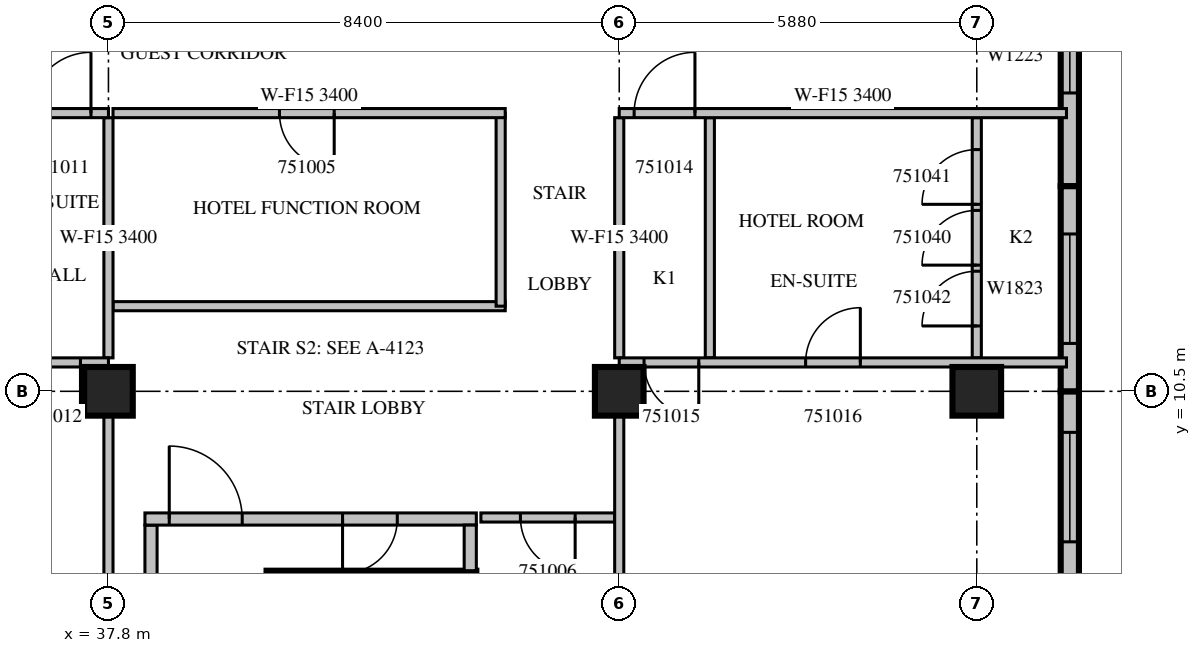
"""IFC4 building model, lengths in metres.
Left out: names, types, materials, properties, quantities, classifications, styles, units other than length and angle.
Written with IfcOpenShell. Run it as: python <this file> out.ifc"""

import sys

from ifc_helpers import new_model, si_unit, direction, frame, frame_2d, origin, origin_2d, place, context, subcontext, project, spatial, rectangle, extrude, source, transform, mapped, element, fill, save


model = new_model("IFC4")
c1 = context("Model", 3, precision=1e-05, world=origin(), true_north=direction((0.0, 1.0)))
c2 = subcontext(c1, "Body", "Model", "MODEL_VIEW")
j1 = project(units=[si_unit("LENGTHUNIT", "METRE"), si_unit("PLANEANGLEUNIT", "RADIAN")], contexts=[c1])
p1 = place(None, origin())
s1 = spatial("IfcSite", under=j1, at=p1, CompositionType="ELEMENT")
p2 = place(p1, origin())
s2 = spatial("IfcBuilding", under=s1, at=p2, CompositionType="ELEMENT")
p3 = place(p2, frame((0.0, 0.0, 227.2)))
s3 = spatial("IfcBuildingStorey", under=s2, at=p3, CompositionType="ELEMENT", Elevation=227.2)
m1 = source(origin(), c2, "Body", "SweptSolid", [
    extrude(rectangle(XDim=0.8, YDim=0.8, at=origin_2d()), origin(), (0.0, 0.0, 1.0), 3.8),
])
for number, where, z_axis, x_axis in (
    (1, (37.8, 10.5, 0.0), (0.0, 0.0, 1.0), (1.0, 0.0, 0.0)),
    (2, (46.2, 10.5, 0.0), (0.0, 0.0, 1.0), (1.0, 0.0, 0.0)),
    (3, (52.08, 10.5, 0.0), (0.0, 0.0, 1.0), (1.0, 0.0, 0.0)),
):
    element("IfcColumn", number, at=place(p3, frame(where, z_axis=z_axis, x_axis=x_axis)), inside=s3, PredefinedType="COLUMN", context=c2, shape_type="MappedRepresentation", body=[
        mapped(m1, transform((0.0, 0.0, 0.0), scale=1.0)),
    ])
m2 = source(origin(), c2, "Body", "SweptSolid", [
    extrude(rectangle(XDim=6.3, YDim=0.3, at=frame_2d((3.15, 0.0))), origin(), (0.0, 0.0, 1.0), 3.4),
])
p4 = place(p3, frame((53.61, 4.2, 0.0), z_axis=(0.0, 0.0, 1.0), x_axis=(0.0, 1.0, 0.0)))
e4 = element("IfcWall", 4, at=p4, inside=s3, PredefinedType="STANDARD", context=c2, shape_type="MappedRepresentation", body=[
    mapped(m2, transform((0.0, 0.0, 0.0), scale=1.0)),
])
m3 = source(origin(), c2, "Body", "SweptSolid", [
    extrude(rectangle(XDim=1.8, YDim=2.3, at=frame_2d((0.9, 1.15))), frame((0.0, 0.16, 0.0), z_axis=(0.0, -1.0, 0.0), x_axis=(1.0, 0.0, 0.0)), (0.0, 0.0, 1.0), 0.32),
])
p5 = place(p4, frame((0.675, 0.0, 0.6)))
e5 = element("IfcOpeningElement", 5, at=p5, cuts=e4, PredefinedType="OPENING", context=c2, shape_type="MappedRepresentation", body=[
    mapped(m3, transform((0.0, 0.0, 0.0), scale=1.0)),
])
p6 = place(p4, frame((3.825, 0.0, 0.6)))
e6 = element("IfcOpeningElement", 6, at=p6, cuts=e4, PredefinedType="OPENING", context=c2, shape_type="MappedRepresentation", body=[
    mapped(m3, transform((0.0, 0.0, 0.0), scale=1.0)),
])
m4 = source(origin(), c2, "Body", "SweptSolid", [
    extrude(rectangle(XDim=3.375, YDim=0.3, at=frame_2d((1.688, 0.0))), origin(), (0.0, 0.0, 1.0), 3.4),
])
p7 = place(p3, frame((53.61, 10.5, 0.0), z_axis=(0.0, 0.0, 1.0), x_axis=(0.0, 1.0, 0.0)))
e7 = element("IfcWall", 7, at=p7, inside=s3, PredefinedType="STANDARD", context=c2, shape_type="MappedRepresentation", body=[
    mapped(m4, transform((0.0, 0.0, 0.0), scale=1.0)),
])
p8 = place(p7, frame((0.787, 0.0, 0.6)))
e8 = element("IfcOpeningElement", 8, at=p8, cuts=e7, PredefinedType="OPENING", context=c2, shape_type="MappedRepresentation", body=[
    mapped(m3, transform((0.0, 0.0, 0.0), scale=1.0)),
])
p9 = place(p3, frame((53.61, 13.875, 0.0), z_axis=(0.0, 0.0, 1.0), x_axis=(0.0, 1.0, 0.0)))
e9 = element("IfcWall", 9, at=p9, inside=s3, PredefinedType="STANDARD", context=c2, shape_type="MappedRepresentation", body=[
    mapped(m4, transform((0.0, 0.0, 0.0), scale=1.0)),
])
m5 = source(origin(), c2, "Body", "SweptSolid", [
    extrude(rectangle(XDim=1.2, YDim=2.3, at=frame_2d((0.6, 1.15))), frame((0.0, 0.16, 0.0), z_axis=(0.0, -1.0, 0.0), x_axis=(1.0, 0.0, 0.0)), (0.0, 0.0, 1.0), 0.32),
])
p10 = place(p9, frame((1.531, 0.0, 0.6)))
e10 = element("IfcOpeningElement", 10, at=p10, cuts=e9, PredefinedType="OPENING", context=c2, shape_type="MappedRepresentation", body=[
    mapped(m5, transform((0.0, 0.0, 0.0), scale=1.0)),
])
m6 = source(origin(), c2, "Body", "SweptSolid", [
    extrude(rectangle(XDim=3.45, YDim=0.25, at=frame_2d((1.725, 0.0))), origin(), (0.0, 0.0, 1.0), 3.4),
])
p11 = place(p3, frame((40.4, 7.425, 0.0), z_axis=(0.0, 0.0, 1.0), x_axis=(1.0, 0.0, 0.0)))
e11 = element("IfcWall", 11, at=p11, inside=s3, PredefinedType="SOLIDWALL", context=c2, shape_type="MappedRepresentation", body=[
    mapped(m6, transform((0.0, 0.0, 0.0), scale=1.0)),
])
m7 = source(origin(), c2, "Body", "SweptSolid", [
    extrude(rectangle(XDim=8.0, YDim=0.2, at=frame_2d((4.0, 0.0))), origin(), (0.0, 0.0, 1.0), 3.4),
])
p12 = place(p3, frame((38.5, 0.3, 0.0), z_axis=(0.0, 0.0, 1.0), x_axis=(0.0, 1.0, 0.0)))
e12 = element("IfcWall", 12, at=p12, inside=s3, PredefinedType="PARTITIONING", context=c2, shape_type="MappedRepresentation", body=[
    mapped(m7, transform((0.0, 0.0, 0.0), scale=1.0)),
])
m8 = source(origin(), c2, "Body", "SweptSolid", [
    extrude(rectangle(XDim=5.45, YDim=0.2, at=frame_2d((2.725, 0.0))), origin(), (0.0, 0.0, 1.0), 3.4),
])
p13 = place(p3, frame((38.4, 8.4, 0.0), z_axis=(0.0, 0.0, 1.0), x_axis=(1.0, 0.0, 0.0)))
e13 = element("IfcWall", 13, at=p13, inside=s3, PredefinedType="PARTITIONING", context=c2, shape_type="MappedRepresentation", body=[
    mapped(m8, transform((0.0, 0.0, 0.0), scale=1.0)),
])
m9 = source(origin(), c2, "Body", "SweptSolid", [
    extrude(rectangle(XDim=1.2, YDim=2.1, at=frame_2d((0.6, 1.05))), frame((0.0, 0.11, 0.0), z_axis=(0.0, -1.0, 0.0), x_axis=(1.0, 0.0, 0.0)), (0.0, 0.0, 1.0), 0.22),
])
p14 = place(p13, frame((0.4, 0.0, 0.0)))
e14 = element("IfcOpeningElement", 14, at=p14, cuts=e13, PredefinedType="OPENING", context=c2, shape_type="MappedRepresentation", body=[
    mapped(m9, transform((0.0, 0.0, 0.0), scale=1.0)),
])
m10 = source(origin(), c2, "Body", "SweptSolid", [
    extrude(rectangle(XDim=0.9, YDim=2.1, at=frame_2d((0.45, 1.05))), frame((0.0, 0.11, 0.0), z_axis=(0.0, -1.0, 0.0), x_axis=(1.0, 0.0, 0.0)), (0.0, 0.0, 1.0), 0.22),
])
p15 = place(p13, frame((3.25, 0.0, 0.0)))
e15 = element("IfcOpeningElement", 15, at=p15, cuts=e13, PredefinedType="OPENING", context=c2, shape_type="MappedRepresentation", body=[
    mapped(m10, transform((0.0, 0.0, 0.0), scale=1.0)),
])
m11 = source(origin(), c2, "Body", "SweptSolid", [
    extrude(rectangle(XDim=0.75, YDim=0.2, at=frame_2d((0.375, 0.0))), origin(), (0.0, 0.0, 1.0), 3.4),
])
p16 = place(p3, frame((43.75, 7.55, 0.0), z_axis=(0.0, 0.0, 1.0), x_axis=(0.0, 1.0, 0.0)))
e16 = element("IfcWall", 16, at=p16, inside=s3, PredefinedType="PARTITIONING", context=c2, shape_type="MappedRepresentation", body=[
    mapped(m11, transform((0.0, 0.0, 0.0), scale=1.0)),
])
m12 = source(origin(), c2, "Body", "SweptSolid", [
    extrude(rectangle(XDim=6.45, YDim=0.15, at=frame_2d((3.225, 0.0))), origin(), (0.0, 0.0, 1.0), 3.4),
])
p17 = place(p3, frame((37.875, 11.9, 0.0), z_axis=(0.0, 0.0, 1.0), x_axis=(1.0, 0.0, 0.0)))
e17 = element("IfcWall", 17, at=p17, inside=s3, PredefinedType="PARTITIONING", context=c2, shape_type="MappedRepresentation", body=[
    mapped(m12, transform((0.0, 0.0, 0.0), scale=1.0)),
])
m13 = source(origin(), c2, "Body", "SweptSolid", [
    extrude(rectangle(XDim=3.175, YDim=0.15, at=frame_2d((1.587, 0.0))), origin(), (0.0, 0.0, 1.0), 3.4),
])
p18 = place(p3, frame((44.25, 11.9, 0.0), z_axis=(0.0, 0.0, 1.0), x_axis=(0.0, 1.0, 0.0)))
e18 = element("IfcWall", 18, at=p18, inside=s3, PredefinedType="PARTITIONING", context=c2, shape_type="MappedRepresentation", body=[
    mapped(m13, transform((0.0, 0.0, 0.0), scale=1.0)),
])
p19 = place(p3, frame((44.325, 15.075, 0.0), z_axis=(0.0, 0.0, 1.0), x_axis=(-1.0, 0.0, 0.0)))
e19 = element("IfcWall", 19, at=p19, inside=s3, PredefinedType="PARTITIONING", context=c2, shape_type="MappedRepresentation", body=[
    mapped(m12, transform((0.0, 0.0, 0.0), scale=1.0)),
])
m14 = source(origin(), c2, "Body", "SweptSolid", [
    extrude(rectangle(XDim=0.9, YDim=2.1, at=frame_2d((0.45, 1.05))), frame((0.0, 0.085, 0.0), z_axis=(0.0, -1.0, 0.0), x_axis=(1.0, 0.0, 0.0)), (0.0, 0.0, 1.0), 0.17),
])
p20 = place(p19, frame((2.812, 0.0, 0.0)))
e20 = element("IfcOpeningElement", 20, at=p20, cuts=e19, PredefinedType="OPENING", context=c2, shape_type="MappedRepresentation", body=[
    mapped(m14, transform((0.0, 0.0, 0.0), scale=1.0)),
])
m15 = source(origin(), c2, "Body", "SweptSolid", [
    extrude(rectangle(XDim=2.2, YDim=0.15, at=frame_2d((1.1, 0.0))), origin(), (0.0, 0.0, 1.0), 3.4),
])
p21 = place(p3, frame((46.125, 8.425, 0.0), z_axis=(0.0, 0.0, 1.0), x_axis=(-1.0, 0.0, 0.0)))
e21 = element("IfcWall", 21, at=p21, inside=s3, PredefinedType="PARTITIONING", context=c2, shape_type="MappedRepresentation", body=[
    mapped(m15, transform((0.0, 0.0, 0.0), scale=1.0)),
])
p22 = place(p21, frame((0.65, 0.0, 0.0)))
e22 = element("IfcOpeningElement", 22, at=p22, cuts=e21, PredefinedType="OPENING", context=c2, shape_type="MappedRepresentation", body=[
    mapped(m14, transform((0.0, 0.0, 0.0), scale=1.0)),
])
p23 = place(p3, frame((37.8, 0.799, 0.0), z_axis=(0.0, 0.0, 1.0), x_axis=(0.0, 1.0, 0.0)))
e23 = element("IfcWall", 23, at=p23, inside=s3, PredefinedType="PARTITIONING", context=c2, shape_type="SweptSolid", body=[
    extrude(rectangle(XDim=9.302, YDim=0.15, at=frame_2d((4.651, 0.0))), origin(), (0.0, 0.0, 1.0), 3.4),
])
m16 = source(origin(), c2, "Body", "SweptSolid", [
    extrude(rectangle(XDim=3.95, YDim=0.15, at=frame_2d((1.975, 0.0))), origin(), (0.0, 0.0, 1.0), 3.4),
])
p24 = place(p3, frame((37.8, 11.05, 0.0), z_axis=(0.0, 0.0, 1.0), x_axis=(0.0, 1.0, 0.0)))
e24 = element("IfcWall", 24, at=p24, inside=s3, PredefinedType="PARTITIONING", context=c2, shape_type="MappedRepresentation", body=[
    mapped(m16, transform((0.0, 0.0, 0.0), scale=1.0)),
])
m17 = source(origin(), c2, "Body", "SweptSolid", [
    extrude(rectangle(XDim=8.4, YDim=0.15, at=frame_2d((4.2, 0.0))), origin(), (0.0, 0.0, 1.0), 2.9),
])
p25 = place(p3, frame((37.8, 10.975, 0.0), z_axis=(0.0, 0.0, 1.0), x_axis=(-1.0, 0.0, 0.0)))
e25 = element("IfcWall", 25, at=p25, inside=s3, PredefinedType="PARTITIONING", context=c2, shape_type="MappedRepresentation", body=[
    mapped(m17, transform((0.0, 0.0, 0.0), scale=1.0)),
])
p26 = place(p25, frame((7.0, 0.0, 0.0)))
e26 = element("IfcOpeningElement", 26, at=p26, cuts=e25, PredefinedType="OPENING", context=c2, shape_type="MappedRepresentation", body=[
    mapped(m14, transform((0.0, 0.0, 0.0), scale=1.0)),
])
p27 = place(p25, frame((5.013, 0.0, 0.0)))
e27 = element("IfcOpeningElement", 27, at=p27, cuts=e25, PredefinedType="OPENING", context=c2, shape_type="MappedRepresentation", body=[
    mapped(m14, transform((0.0, 0.0, 0.0), scale=1.0)),
])
p28 = place(p25, frame((2.388, 0.0, 0.0)))
e28 = element("IfcOpeningElement", 28, at=p28, cuts=e25, PredefinedType="OPENING", context=c2, shape_type="MappedRepresentation", body=[
    mapped(m14, transform((0.0, 0.0, 0.0), scale=1.0)),
])
p29 = place(p25, frame((0.46, 0.0, 0.0)))
e29 = element("IfcOpeningElement", 29, at=p29, cuts=e25, PredefinedType="OPENING", context=c2, shape_type="MappedRepresentation", body=[
    mapped(m14, transform((0.0, 0.0, 0.0), scale=1.0)),
])
p30 = place(p3, frame((47.69, 11.05, 0.0), z_axis=(0.0, 0.0, 1.0), x_axis=(0.0, 1.0, 0.0)))
e30 = element("IfcWall", 30, at=p30, inside=s3, PredefinedType="PARTITIONING", context=c2, shape_type="MappedRepresentation", body=[
    mapped(m16, transform((0.0, 0.0, 0.0), scale=1.0)),
])
p31 = place(p3, frame((52.08, 11.05, 0.0), z_axis=(0.0, 0.0, 1.0), x_axis=(0.0, 1.0, 0.0)))
e31 = element("IfcWall", 31, at=p31, inside=s3, PredefinedType="PARTITIONING", context=c2, shape_type="MappedRepresentation", body=[
    mapped(m16, transform((0.0, 0.0, 0.0), scale=1.0)),
])
p32 = place(p31, frame((1.525, 0.0, 0.0)))
e32 = element("IfcOpeningElement", 32, at=p32, cuts=e31, PredefinedType="OPENING", context=c2, shape_type="MappedRepresentation", body=[
    mapped(m14, transform((0.0, 0.0, 0.0), scale=1.0)),
])
p33 = place(p31, frame((2.525, 0.0, 0.0)))
e33 = element("IfcOpeningElement", 33, at=p33, cuts=e31, PredefinedType="OPENING", context=c2, shape_type="MappedRepresentation", body=[
    mapped(m14, transform((0.0, 0.0, 0.0), scale=1.0)),
])
p34 = place(p31, frame((0.525, 0.0, 0.0)))
e34 = element("IfcOpeningElement", 34, at=p34, cuts=e31, PredefinedType="OPENING", context=c2, shape_type="MappedRepresentation", body=[
    mapped(m14, transform((0.0, 0.0, 0.0), scale=1.0)),
])
m18 = source(origin(), c2, "Body", "SweptSolid", [
    extrude(rectangle(XDim=9.302, YDim=0.15, at=frame_2d((4.651, 0.0))), origin(), (0.0, 0.0, 1.0), 3.4),
])
p35 = place(p3, frame((46.2, 0.799, 0.0), z_axis=(0.0, 0.0, 1.0), x_axis=(0.0, 1.0, 0.0)))
e35 = element("IfcWall", 35, at=p35, inside=s3, PredefinedType="PARTITIONING", context=c2, shape_type="MappedRepresentation", body=[
    mapped(m18, transform((0.0, 0.0, 0.0), scale=1.0)),
])
p36 = place(p3, frame((46.2, 11.05, 0.0), z_axis=(0.0, 0.0, 1.0), x_axis=(0.0, 1.0, 0.0)))
e36 = element("IfcWall", 36, at=p36, inside=s3, PredefinedType="PARTITIONING", context=c2, shape_type="MappedRepresentation", body=[
    mapped(m16, transform((0.0, 0.0, 0.0), scale=1.0)),
])
m19 = source(origin(), c2, "Body", "SweptSolid", [
    extrude(rectangle(XDim=7.355, YDim=0.15, at=frame_2d((3.678, 0.0))), origin(), (0.0, 0.0, 1.0), 3.4),
])
p37 = place(p3, frame((53.555, 10.975, 0.0), z_axis=(0.0, 0.0, 1.0), x_axis=(-1.0, 0.0, 0.0)))
e37 = element("IfcWall", 37, at=p37, inside=s3, PredefinedType="PARTITIONING", context=c2, shape_type="MappedRepresentation", body=[
    mapped(m19, transform((0.0, 0.0, 0.0), scale=1.0)),
])
p38 = place(p37, frame((6.047, 0.0, 0.0)))
e38 = element("IfcOpeningElement", 38, at=p38, cuts=e37, PredefinedType="OPENING", context=c2, shape_type="MappedRepresentation", body=[
    mapped(m14, transform((0.0, 0.0, 0.0), scale=1.0)),
])
p39 = place(p37, frame((3.39, 0.0, 0.0)))
e39 = element("IfcOpeningElement", 39, at=p39, cuts=e37, PredefinedType="OPENING", context=c2, shape_type="MappedRepresentation", body=[
    mapped(m14, transform((0.0, 0.0, 0.0), scale=1.0)),
])
p40 = place(p3, frame((37.8, 15.075, 0.0), z_axis=(0.0, 0.0, 1.0), x_axis=(-1.0, 0.0, 0.0)))
e40 = element("IfcWall", 40, at=p40, inside=s3, PredefinedType="PARTITIONING", context=c2, shape_type="MappedRepresentation", body=[
    mapped(m17, transform((0.0, 0.0, 0.0), scale=1.0)),
])
m20 = source(origin(), c2, "Body", "SweptSolid", [
    extrude(rectangle(XDim=1.0, YDim=2.1, at=frame_2d((0.5, 1.05))), frame((0.0, 0.085, 0.0), z_axis=(0.0, -1.0, 0.0), x_axis=(1.0, 0.0, 0.0)), (0.0, 0.0, 1.0), 0.17),
])
p41 = place(p40, frame((7.112, 0.0, 0.0)))
e41 = element("IfcOpeningElement", 41, at=p41, cuts=e40, PredefinedType="OPENING", context=c2, shape_type="MappedRepresentation", body=[
    mapped(m20, transform((0.0, 0.0, 0.0), scale=1.0)),
])
p42 = place(p40, frame((0.287, 0.0, 0.0)))
e42 = element("IfcOpeningElement", 42, at=p42, cuts=e40, PredefinedType="OPENING", context=c2, shape_type="MappedRepresentation", body=[
    mapped(m20, transform((0.0, 0.0, 0.0), scale=1.0)),
])
p43 = place(p3, frame((53.555, 15.075, 0.0), z_axis=(0.0, 0.0, 1.0), x_axis=(-1.0, 0.0, 0.0)))
e43 = element("IfcWall", 43, at=p43, inside=s3, PredefinedType="PARTITIONING", context=c2, shape_type="MappedRepresentation", body=[
    mapped(m19, transform((0.0, 0.0, 0.0), scale=1.0)),
])
p44 = place(p43, frame((6.11, 0.0, 0.0)))
e44 = element("IfcOpeningElement", 44, at=p44, cuts=e43, PredefinedType="OPENING", context=c2, shape_type="MappedRepresentation", body=[
    mapped(m20, transform((0.0, 0.0, 0.0), scale=1.0)),
])
m21 = source(origin(), c2, "Body", "SweptSolid", [
    extrude(rectangle(XDim=1.8, YDim=2.3, at=frame_2d((0.9, 1.15))), frame((0.0, 0.03, 0.0), z_axis=(0.0, -1.0, 0.0), x_axis=(1.0, 0.0, 0.0)), (0.0, 0.0, 1.0), 0.06),
])
p45 = place(p6, origin())
e45 = element("IfcWindow", 45, at=p45, inside=s3, PartitioningType="SINGLE_PANEL", PredefinedType="WINDOW", context=c2, shape_type="MappedRepresentation", body=[
    mapped(m21, transform((0.0, 0.0, 0.0), scale=1.0)),
])
fill(e6, e45)
p46 = place(p8, origin())
e46 = element("IfcWindow", 46, at=p46, inside=s3, PartitioningType="SINGLE_PANEL", PredefinedType="WINDOW", context=c2, shape_type="MappedRepresentation", body=[
    mapped(m21, transform((0.0, 0.0, 0.0), scale=1.0)),
])
fill(e8, e46)
m22 = source(origin(), c2, "Body", "SweptSolid", [
    extrude(rectangle(XDim=1.2, YDim=2.3, at=frame_2d((0.6, 1.15))), frame((0.0, 0.03, 0.0), z_axis=(0.0, -1.0, 0.0), x_axis=(1.0, 0.0, 0.0)), (0.0, 0.0, 1.0), 0.06),
])
p47 = place(p10, origin())
e47 = element("IfcWindow", 47, at=p47, inside=s3, PartitioningType="SINGLE_PANEL", PredefinedType="WINDOW", context=c2, shape_type="MappedRepresentation", body=[
    mapped(m22, transform((0.0, 0.0, 0.0), scale=1.0)),
])
fill(e10, e47)
m23 = source(origin(), c2, "Body", "SweptSolid", [
    extrude(rectangle(XDim=1.2, YDim=2.1, at=frame_2d((0.6, 1.05))), frame((0.0, 0.025, 0.0), z_axis=(0.0, -1.0, 0.0), x_axis=(1.0, 0.0, 0.0)), (0.0, 0.0, 1.0), 0.05),
])
p48 = place(p14, origin())
e48 = element("IfcDoor", 48, at=p48, inside=s3, OperationType="SINGLE_SWING_LEFT", PredefinedType="DOOR", context=c2, shape_type="MappedRepresentation", body=[
    mapped(m23, transform((0.0, 0.0, 0.0), scale=1.0)),
])
fill(e14, e48)
m24 = source(origin(), c2, "Body", "SweptSolid", [
    extrude(rectangle(XDim=0.9, YDim=2.1, at=frame_2d((0.45, 1.05))), frame((0.0, 0.025, 0.0), z_axis=(0.0, -1.0, 0.0), x_axis=(1.0, 0.0, 0.0)), (0.0, 0.0, 1.0), 0.05),
])
p49 = place(p15, origin())
e49 = element("IfcDoor", 49, at=p49, inside=s3, OperationType="SINGLE_SWING_RIGHT", PredefinedType="DOOR", context=c2, shape_type="MappedRepresentation", body=[
    mapped(m24, transform((0.0, 0.0, 0.0), scale=1.0)),
])
fill(e15, e49)
p50 = place(p20, origin())
e50 = element("IfcDoor", 50, at=p50, inside=s3, OperationType="SINGLE_SWING_LEFT", PredefinedType="DOOR", context=c2, shape_type="MappedRepresentation", body=[
    mapped(m24, transform((0.0, 0.0, 0.0), scale=1.0)),
])
fill(e20, e50)
p51 = place(p22, origin())
e51 = element("IfcDoor", 51, at=p51, inside=s3, OperationType="SINGLE_SWING_LEFT", PredefinedType="DOOR", context=c2, shape_type="MappedRepresentation", body=[
    mapped(m24, transform((0.0, 0.0, 0.0), scale=1.0)),
])
fill(e22, e51)
m25 = source(origin(), c2, "Body", "SweptSolid", [
    extrude(rectangle(XDim=1.0, YDim=2.1, at=frame_2d((0.5, 1.05))), frame((0.0, 0.025, 0.0), z_axis=(0.0, -1.0, 0.0), x_axis=(1.0, 0.0, 0.0)), (0.0, 0.0, 1.0), 0.05),
])
p52 = place(p42, origin())
e52 = element("IfcDoor", 52, at=p52, inside=s3, OperationType="SINGLE_SWING_RIGHT", PredefinedType="DOOR", context=c2, shape_type="MappedRepresentation", body=[
    mapped(m25, transform((0.0, 0.0, 0.0), scale=1.0)),
])
fill(e42, e52)
p53 = place(p29, origin())
e53 = element("IfcDoor", 53, at=p53, inside=s3, OperationType="SINGLE_SWING_LEFT", PredefinedType="DOOR", context=c2, shape_type="MappedRepresentation", body=[
    mapped(m24, transform((0.0, 0.0, 0.0), scale=1.0)),
])
fill(e29, e53)
p54 = place(p44, origin())
e54 = element("IfcDoor", 54, at=p54, inside=s3, OperationType="SINGLE_SWING_RIGHT", PredefinedType="DOOR", context=c2, shape_type="MappedRepresentation", body=[
    mapped(m25, transform((0.0, 0.0, 0.0), scale=1.0)),
])
fill(e44, e54)
p55 = place(p38, origin())
e55 = element("IfcDoor", 55, at=p55, inside=s3, OperationType="SINGLE_SWING_LEFT", PredefinedType="DOOR", context=c2, shape_type="MappedRepresentation", body=[
    mapped(m24, transform((0.0, 0.0, 0.0), scale=1.0)),
])
fill(e38, e55)
p56 = place(p39, origin())
e56 = element("IfcDoor", 56, at=p56, inside=s3, OperationType="SINGLE_SWING_RIGHT", PredefinedType="DOOR", context=c2, shape_type="MappedRepresentation", body=[
    mapped(m24, transform((0.0, 0.0, 0.0), scale=1.0)),
])
fill(e39, e56)
p57 = place(p32, origin())
e57 = element("IfcDoor", 57, at=p57, inside=s3, OperationType="SINGLE_SWING_LEFT", PredefinedType="DOOR", context=c2, shape_type="MappedRepresentation", body=[
    mapped(m24, transform((0.0, 0.0, 0.0), scale=1.0)),
])
fill(e32, e57)
p58 = place(p33, origin())
e58 = element("IfcDoor", 58, at=p58, inside=s3, OperationType="SINGLE_SWING_LEFT", PredefinedType="DOOR", context=c2, shape_type="MappedRepresentation", body=[
    mapped(m24, transform((0.0, 0.0, 0.0), scale=1.0)),
])
fill(e33, e58)
p59 = place(p34, origin())
e59 = element("IfcDoor", 59, at=p59, inside=s3, OperationType="SINGLE_SWING_LEFT", PredefinedType="DOOR", context=c2, shape_type="MappedRepresentation", body=[
    mapped(m24, transform((0.0, 0.0, 0.0), scale=1.0)),
])
fill(e34, e59)
save(model, sys.argv[1])
